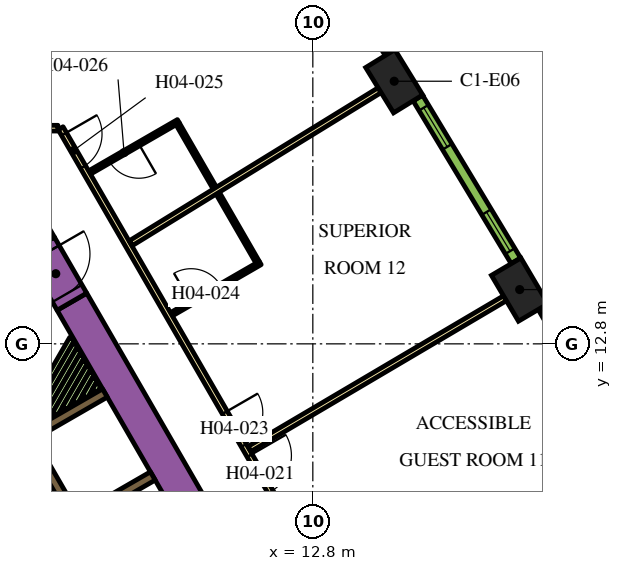
"""IFC4 building model, lengths in metres.
Left out: names, types, materials, properties, quantities, classifications, styles, units other than length and angle.
Written with IfcOpenShell. Run it as: python <this file> out.ifc"""

import sys

from ifc_helpers import new_model, si_unit, direction, frame, frame_2d, origin, origin_2d, place, context, subcontext, project, spatial, rectangle, extrude, element, fill, save


model = new_model("IFC4")
c1 = context("Model", 3, precision=1e-05, world=origin(), true_north=direction((0.0, 1.0)))
c2 = subcontext(c1, "Body", "Model", "MODEL_VIEW")
j1 = project(units=[si_unit("LENGTHUNIT", "METRE"), si_unit("PLANEANGLEUNIT", "RADIAN")], contexts=[c1])
p1 = place(None, origin())
s1 = spatial("IfcSite", under=j1, at=p1, CompositionType="ELEMENT")
p2 = place(p1, origin())
s2 = spatial("IfcBuilding", under=s1, at=p2, CompositionType="ELEMENT")
p3 = place(p2, frame((0.0, 0.0, 66.6)))
s3 = spatial("IfcBuildingStorey", under=s2, at=p3, CompositionType="ELEMENT", Elevation=66.6)
for number, where, z_axis, x_axis in (
    (1, (18.243, 14.228, 0.0), (0.0, 0.0, 1.0), (-0.508, 0.861, 0.0)),
    (2, (14.942, 19.71, 0.0), (0.0, 0.0, 1.0), (-0.524, 0.852, 0.0)),
):
    element("IfcColumn", number, at=place(p3, frame(where, z_axis=z_axis, x_axis=x_axis)), inside=s3, PredefinedType="COLUMN", context=c2, shape_type="SweptSolid", body=[
        extrude(rectangle(XDim=1.4, YDim=0.9, at=origin_2d()), origin(), (0.0, 0.0, 1.0), 3.9),
    ])
p4 = place(p3, frame((6.461, 13.909, 0.0), z_axis=(0.0, 0.0, 1.0), x_axis=(0.500005804227, -0.866022052686, 0.0)))
e3 = element("IfcWall", 3, at=p4, inside=s3, PredefinedType="SOLIDWALL", context=c2, shape_type="SweptSolid", body=[
    extrude(rectangle(XDim=20.834, YDim=0.9, at=frame_2d((10.417, 0.0))), origin(), (0.0, 0.0, 1.0), 3.9),
])
p5 = place(p3, frame((5.611, 15.382, 0.0), z_axis=(0.0, 0.0, 1.0), x_axis=(-0.500102178127, 0.865966403178, 0.0)))
e4 = element("IfcWall", 4, at=p5, inside=s3, PredefinedType="SOLIDWALL", context=c2, shape_type="SweptSolid", body=[
    extrude(rectangle(XDim=0.464, YDim=0.9, at=frame_2d((0.232, 0.0))), origin(), (0.0, 0.0, 1.0), 3.9),
])
p6 = place(p3, frame((6.684, 8.224, 0.0), z_axis=(0.0, 0.0, 1.0), x_axis=(0.86605622881, 0.499946605688, 0.0)))
e5 = element("IfcWall", 5, at=p6, inside=s3, PredefinedType="SOLIDWALL", context=c2, shape_type="SweptSolid", body=[
    extrude(rectangle(XDim=2.2, YDim=0.25, at=frame_2d((1.1, 0.0))), origin(), (0.0, 0.0, 1.0), 3.9),
])
p7 = place(p3, frame((4.776, 10.032, 0.0), z_axis=(0.0, 0.0, 1.0), x_axis=(0.86600215702, 0.500040262416, 0.0)))
e6 = element("IfcWall", 6, at=p7, inside=s3, PredefinedType="SOLIDWALL", context=c2, shape_type="SweptSolid", body=[
    extrude(rectangle(XDim=2.948, YDim=0.25, at=frame_2d((1.474, 0.0))), origin(), (0.0, 0.0, 1.0), 3.9),
])
p8 = place(p3, frame((4.982, 10.359, 0.0), z_axis=(0.0, 0.0, 1.0), x_axis=(0.500051824031, 0.865995481099, 0.0)))
e7 = element("IfcWall", 7, at=p8, inside=s3, PredefinedType="PARTITIONING", context=c2, shape_type="SweptSolid", body=[
    extrude(rectangle(XDim=2.973, YDim=0.15, at=frame_2d((1.486, 0.0))), origin(), (0.0, 0.0, 1.0), 2.75),
])
p9 = place(p3, frame((5.242, 10.509, 0.0), z_axis=(0.0, 0.0, 1.0), x_axis=(0.499958506883, 0.866049358521, 0.0)))
e8 = element("IfcWall", 8, at=p9, inside=s3, PredefinedType="PARTITIONING", context=c2, shape_type="SweptSolid", body=[
    extrude(rectangle(XDim=2.626, YDim=0.15, at=frame_2d((1.313, 0.0))), origin(), (0.0, 0.0, 1.0), 2.75),
])
p10 = place(p3, frame((5.501, 10.659, 0.0), z_axis=(0.0, 0.0, 1.0), x_axis=(0.499951092774, 0.866053638543, 0.0)))
e9 = element("IfcWall", 9, at=p10, inside=s3, PredefinedType="PARTITIONING", context=c2, shape_type="SweptSolid", body=[
    extrude(rectangle(XDim=2.28, YDim=0.15, at=frame_2d((1.14, 0.0))), origin(), (0.0, 0.0, 1.0), 2.75),
])
p11 = place(p3, frame((5.761, 10.809, 0.0), z_axis=(0.0, 0.0, 1.0), x_axis=(0.499900985997, 0.866082561999, 0.0)))
e10 = element("IfcWall", 10, at=p11, inside=s3, PredefinedType="PARTITIONING", context=c2, shape_type="SweptSolid", body=[
    extrude(rectangle(XDim=1.934, YDim=0.15, at=frame_2d((0.967, 0.0))), origin(), (0.0, 0.0, 1.0), 2.75),
])
p12 = place(p3, frame((6.021, 10.959, 0.0), z_axis=(0.0, 0.0, 1.0), x_axis=(0.499944387978, 0.86605750902, 0.0)))
e11 = element("IfcWall", 11, at=p12, inside=s3, PredefinedType="PARTITIONING", context=c2, shape_type="SweptSolid", body=[
    extrude(rectangle(XDim=1.587, YDim=0.15, at=frame_2d((0.793, 0.0))), origin(), (0.0, 0.0, 1.0), 2.75),
])
p13 = place(p3, frame((6.281, 11.109, 0.0), z_axis=(0.0, 0.0, 1.0), x_axis=(0.500012022864, 0.866018462269, 0.0)))
e12 = element("IfcWall", 12, at=p13, inside=s3, PredefinedType="PARTITIONING", context=c2, shape_type="SweptSolid", body=[
    extrude(rectangle(XDim=1.241, YDim=0.15, at=frame_2d((0.62, 0.0))), origin(), (0.0, 0.0, 1.0), 2.75),
])
p14 = place(p3, frame((6.541, 11.259, 0.0), z_axis=(0.0, 0.0, 1.0), x_axis=(0.500132045864, 0.865949153646, 0.0)))
e13 = element("IfcWall", 13, at=p14, inside=s3, PredefinedType="PARTITIONING", context=c2, shape_type="SweptSolid", body=[
    extrude(rectangle(XDim=0.894, YDim=0.15, at=frame_2d((0.447, 0.0))), origin(), (0.0, 0.0, 1.0), 2.75),
])
p15 = place(p3, frame((6.8, 11.409, 0.0), z_axis=(0.0, 0.0, 1.0), x_axis=(0.500210807569, 0.865903659763, 0.0)))
e14 = element("IfcWall", 14, at=p15, inside=s3, PredefinedType="PARTITIONING", context=c2, shape_type="SweptSolid", body=[
    extrude(rectangle(XDim=0.548, YDim=0.15, at=frame_2d((0.274, 0.0))), origin(), (0.0, 0.0, 1.0), 2.75),
])
p16 = place(p3, frame((7.06, 11.559, 0.0), z_axis=(0.0, 0.0, 1.0), x_axis=(0.499267785915, 0.866447735266, 0.0)))
e15 = element("IfcWall", 15, at=p16, inside=s3, PredefinedType="PARTITIONING", context=c2, shape_type="SweptSolid", body=[
    extrude(rectangle(XDim=0.201, YDim=0.15, at=frame_2d((0.101, 0.0))), origin(), (0.0, 0.0, 1.0), 2.75),
])
p17 = place(p3, frame((11.553, -0.46, 0.0), z_axis=(0.0, 0.0, 1.0), x_axis=(-0.500006514828, 0.866021642414, 0.0)))
e16 = element("IfcWall", 16, at=p17, inside=s3, PredefinedType="SOLIDWALL", context=c2, shape_type="SweptSolid", body=[
    extrude(rectangle(XDim=12.35, YDim=0.25, at=frame_2d((6.175, 0.0))), origin(), (0.0, 0.0, 1.0), 3.9),
])
p18 = place(p17, frame((0.585, 0.0, 0.0)))
e17 = element("IfcOpeningElement", 17, at=p18, cuts=e16, PredefinedType="OPENING", context=c2, shape_type="SweptSolid", body=[
    extrude(rectangle(XDim=1.1, YDim=2.1, at=frame_2d((0.55, 1.05))), frame((0.0, 0.135, 0.0), z_axis=(0.0, -1.0, 0.0), x_axis=(1.0, 0.0, 0.0)), (0.0, 0.0, 1.0), 0.27),
])
p19 = place(p17, frame((3.105, 0.0, 0.0)))
e18 = element("IfcOpeningElement", 18, at=p19, cuts=e16, PredefinedType="OPENING", context=c2, shape_type="SweptSolid", body=[
    extrude(rectangle(XDim=1.1, YDim=2.1, at=frame_2d((0.55, 1.05))), frame((0.0, 0.135, 0.0), z_axis=(0.0, -1.0, 0.0), x_axis=(1.0, 0.0, 0.0)), (0.0, 0.0, 1.0), 0.27),
])
p20 = place(p17, frame((5.625, 0.0, 0.0)))
e19 = element("IfcOpeningElement", 19, at=p20, cuts=e16, PredefinedType="OPENING", context=c2, shape_type="SweptSolid", body=[
    extrude(rectangle(XDim=1.1, YDim=2.1, at=frame_2d((0.55, 1.05))), frame((0.0, 0.135, 0.0), z_axis=(0.0, -1.0, 0.0), x_axis=(1.0, 0.0, 0.0)), (0.0, 0.0, 1.0), 0.27),
])
p21 = place(p3, frame((5.611, 15.382, 0.0), z_axis=(0.0, 0.0, 1.0), x_axis=(0.500062241894, -0.865989465428, 0.0)))
e20 = element("IfcWall", 20, at=p21, inside=s3, PredefinedType="SOLIDWALL", context=c2, shape_type="SweptSolid", body=[
    extrude(rectangle(XDim=1.7, YDim=0.9, at=frame_2d((0.85, 0.0))), origin(), (0.0, 0.0, 1.0), 3.9),
])
p22 = place(p21, frame((0.25, 0.0, 0.0)))
e21 = element("IfcOpeningElement", 21, at=p22, cuts=e20, PredefinedType="OPENING", context=c2, shape_type="SweptSolid", body=[
    extrude(rectangle(XDim=1.2, YDim=2.1, at=frame_2d((0.6, 1.05))), frame((0.0, 0.46, 0.0), z_axis=(0.0, -1.0, 0.0), x_axis=(1.0, 0.0, 0.0)), (0.0, 0.0, 1.0), 0.92),
])
p23 = place(p3, frame((6.163, 18.475, 0.0), z_axis=(0.0, 0.0, 1.0), x_axis=(0.500001317485, -0.866024643133, 0.0)))
e22 = element("IfcWall", 22, at=p23, inside=s3, PredefinedType="PARTITIONING", context=c2, shape_type="SweptSolid", body=[
    extrude(rectangle(XDim=25.767, YDim=0.15, at=frame_2d((12.883, 0.0))), origin(), (0.0, 0.0, 1.0), 2.75),
])
p24 = place(p23, frame((21.138, 0.0, 0.0)))
e23 = element("IfcOpeningElement", 23, at=p24, cuts=e22, PredefinedType="OPENING", context=c2, shape_type="SweptSolid", body=[
    extrude(rectangle(XDim=1.0, YDim=2.1, at=frame_2d((0.5, 1.05))), frame((0.0, 0.085, 0.0), z_axis=(0.0, -1.0, 0.0), x_axis=(1.0, 0.0, 0.0)), (0.0, 0.0, 1.0), 0.17),
])
p25 = place(p23, frame((9.948, 0.0, 0.0)))
e24 = element("IfcOpeningElement", 24, at=p25, cuts=e22, PredefinedType="OPENING", context=c2, shape_type="SweptSolid", body=[
    extrude(rectangle(XDim=1.1, YDim=2.1, at=frame_2d((0.55, 1.05))), frame((0.0, 0.085, 0.0), z_axis=(0.0, -1.0, 0.0), x_axis=(1.0, 0.0, 0.0)), (0.0, 0.0, 1.0), 0.17),
])
p26 = place(p23, frame((8.641, 0.0, 0.0)))
e25 = element("IfcOpeningElement", 25, at=p26, cuts=e22, PredefinedType="OPENING", context=c2, shape_type="SweptSolid", body=[
    extrude(rectangle(XDim=1.0, YDim=2.1, at=frame_2d((0.5, 1.05))), frame((0.0, 0.085, 0.0), z_axis=(0.0, -1.0, 0.0), x_axis=(1.0, 0.0, 0.0)), (0.0, 0.0, 1.0), 0.17),
])
p27 = place(p23, frame((0.18, 0.0, 0.0)))
e26 = element("IfcOpeningElement", 26, at=p27, cuts=e22, PredefinedType="OPENING", context=c2, shape_type="SweptSolid", body=[
    extrude(rectangle(XDim=1.0, YDim=2.1, at=frame_2d((0.5, 1.05))), frame((0.0, 0.085, 0.0), z_axis=(0.0, -1.0, 0.0), x_axis=(1.0, 0.0, 0.0)), (0.0, 0.0, 1.0), 0.17),
])
p28 = place(p3, frame((0.825, 18.475, 0.0), z_axis=(0.0, 0.0, 1.0), x_axis=(1.0, 0.0, 0.0)))
e27 = element("IfcWall", 27, at=p28, inside=s3, PredefinedType="PARTITIONING", context=c2, shape_type="SweptSolid", body=[
    extrude(rectangle(XDim=5.268, YDim=0.15, at=frame_2d((2.634, 0.0))), origin(), (0.0, 0.0, 1.0), 2.75),
])
p29 = place(p3, frame((11.16, 24.888, 0.0), z_axis=(0.0, 0.0, 1.0), x_axis=(-0.84199813156, -0.539480441211, 0.0)))
e28 = element("IfcWall", 28, at=p29, inside=s3, PredefinedType="PARTITIONING", context=c2, shape_type="SweptSolid", body=[
    extrude(rectangle(XDim=11.638, YDim=0.15, at=frame_2d((5.819, 0.0))), origin(), (0.0, 0.0, 1.0), 2.75),
])
p30 = place(p3, frame((14.558, 19.475, 0.0), z_axis=(0.0, 0.0, 1.0), x_axis=(-0.851829455142, -0.523819223925, 0.0)))
e29 = element("IfcWall", 29, at=p30, inside=s3, PredefinedType="PARTITIONING", context=c2, shape_type="SweptSolid", body=[
    extrude(rectangle(XDim=7.688, YDim=0.15, at=frame_2d((3.844, 0.0))), origin(), (0.0, 0.0, 1.0), 2.75),
])
p31 = place(p3, frame((17.856, 13.999, 0.0), z_axis=(0.0, 0.0, 1.0), x_axis=(-0.861371519381, -0.507975497047, 0.0)))
e30 = element("IfcWall", 30, at=p31, inside=s3, PredefinedType="PARTITIONING", context=c2, shape_type="SweptSolid", body=[
    extrude(rectangle(XDim=7.804, YDim=0.15, at=frame_2d((3.902, 0.0))), origin(), (0.0, 0.0, 1.0), 2.75),
])
p32 = place(p3, frame((9.077, 13.578, 0.0), z_axis=(0.0, 0.0, 1.0), x_axis=(0.866036505625, 0.499980770555, 0.0)))
e31 = element("IfcWall", 31, at=p32, inside=s3, PredefinedType="PARTITIONING", context=c2, shape_type="SweptSolid", body=[
    extrude(rectangle(XDim=2.7, YDim=0.1, at=frame_2d((1.35, 0.0))), origin(), (0.0, 0.0, 1.0), 2.75),
])
p33 = place(p32, frame((0.6, 0.0, 0.0)))
e32 = element("IfcOpeningElement", 32, at=p33, cuts=e31, PredefinedType="OPENING", context=c2, shape_type="SweptSolid", body=[
    extrude(rectangle(XDim=0.9, YDim=2.1, at=frame_2d((0.45, 1.05))), frame((0.0, 0.06, 0.0), z_axis=(0.0, -1.0, 0.0), x_axis=(1.0, 0.0, 0.0)), (0.0, 0.0, 1.0), 0.12),
])
p34 = place(p3, frame((11.342, 14.955, 0.0), z_axis=(0.0, 0.0, 1.0), x_axis=(-0.500008976872, 0.866020220923, 0.0)))
e33 = element("IfcWall", 33, at=p34, inside=s3, PredefinedType="PARTITIONING", context=c2, shape_type="SweptSolid", body=[
    extrude(rectangle(XDim=2.09, YDim=0.1, at=frame_2d((1.045, 0.0))), origin(), (0.0, 0.0, 1.0), 2.75),
])
p35 = place(p3, frame((9.262, 18.658, 0.0), z_axis=(0.0, 0.0, 1.0), x_axis=(-0.866019956843, -0.50000943426, 0.0)))
e34 = element("IfcWall", 34, at=p35, inside=s3, PredefinedType="PARTITIONING", context=c2, shape_type="SweptSolid", body=[
    extrude(rectangle(XDim=2.7, YDim=0.1, at=frame_2d((1.35, 0.0))), origin(), (0.0, 0.0, 1.0), 2.75),
])
p36 = place(p35, frame((1.2, 0.0, 0.0)))
e35 = element("IfcOpeningElement", 35, at=p36, cuts=e34, PredefinedType="OPENING", context=c2, shape_type="SweptSolid", body=[
    extrude(rectangle(XDim=0.9, YDim=2.1, at=frame_2d((0.45, 1.05))), frame((0.0, 0.06, 0.0), z_axis=(0.0, -1.0, 0.0), x_axis=(1.0, 0.0, 0.0)), (0.0, 0.0, 1.0), 0.12),
])
p37 = place(p3, frame((9.244, 18.589, 0.0), z_axis=(0.0, 0.0, 1.0), x_axis=(0.500043961785, -0.866000020948, 0.0)))
e36 = element("IfcWall", 36, at=p37, inside=s3, PredefinedType="PARTITIONING", context=c2, shape_type="SweptSolid", body=[
    extrude(rectangle(XDim=1.95, YDim=0.1, at=frame_2d((0.975, 0.0))), origin(), (0.0, 0.0, 1.0), 2.75),
])
p38 = place(p3, frame((21.357, 9.445, 0.0), z_axis=(0.0, 0.0, 1.0), x_axis=(-0.50002123722, 0.866013142123, 0.0)))
e37 = element("IfcWall", 37, at=p38, inside=s3, PredefinedType="SOLIDWALL", context=c2, shape_type="SweptSolid", body=[
    extrude(rectangle(XDim=4.998, YDim=0.29, at=frame_2d((2.499, 0.0))), origin(), (0.0, 0.0, 1.0), 3.65),
])
p39 = place(p38, frame((0.297, 0.0, 0.9)))
e38 = element("IfcOpeningElement", 38, at=p39, cuts=e37, PredefinedType="OPENING", context=c2, shape_type="SweptSolid", body=[
    extrude(rectangle(XDim=1.2, YDim=2.15, at=frame_2d((0.6, 1.075))), frame((0.0, 0.155, 0.0), z_axis=(0.0, -1.0, 0.0), x_axis=(1.0, 0.0, 0.0)), (0.0, 0.0, 1.0), 0.31),
])
p40 = place(p38, frame((3.501, 0.0, 0.9)))
e39 = element("IfcOpeningElement", 39, at=p40, cuts=e37, PredefinedType="OPENING", context=c2, shape_type="SweptSolid", body=[
    extrude(rectangle(XDim=1.2, YDim=2.15, at=frame_2d((0.6, 1.075))), frame((0.0, 0.155, 0.0), z_axis=(0.0, -1.0, 0.0), x_axis=(1.0, 0.0, 0.0)), (0.0, 0.0, 1.0), 0.31),
])
p41 = place(p3, frame((18.143, 14.986, 0.0), z_axis=(0.0, 0.0, 1.0), x_axis=(-0.515938796285, 0.856625448191, 0.0)))
e40 = element("IfcWall", 40, at=p41, inside=s3, PredefinedType="SOLIDWALL", context=c2, shape_type="SweptSolid", body=[
    extrude(rectangle(XDim=4.998, YDim=0.29, at=frame_2d((2.499, 0.0))), origin(), (0.0, 0.0, 1.0), 3.65),
])
p42 = place(p41, frame((0.297, 0.0, 0.9)))
e41 = element("IfcOpeningElement", 41, at=p42, cuts=e40, PredefinedType="OPENING", context=c2, shape_type="SweptSolid", body=[
    extrude(rectangle(XDim=1.2, YDim=2.15, at=frame_2d((0.6, 1.075))), frame((0.0, 0.155, 0.0), z_axis=(0.0, -1.0, 0.0), x_axis=(1.0, 0.0, 0.0)), (0.0, 0.0, 1.0), 0.31),
])
p43 = place(p41, frame((3.501, 0.0, 0.9)))
e42 = element("IfcOpeningElement", 42, at=p43, cuts=e40, PredefinedType="OPENING", context=c2, shape_type="SweptSolid", body=[
    extrude(rectangle(XDim=1.2, YDim=2.15, at=frame_2d((0.6, 1.075))), frame((0.0, 0.155, 0.0), z_axis=(0.0, -1.0, 0.0), x_axis=(1.0, 0.0, 0.0)), (0.0, 0.0, 1.0), 0.31),
])
p44 = place(p3, frame((14.827, 20.466, 0.0), z_axis=(0.0, 0.0, 1.0), x_axis=(-0.531688286542, 0.846940119462, 0.0)))
e43 = element("IfcWall", 43, at=p44, inside=s3, PredefinedType="SOLIDWALL", context=c2, shape_type="SweptSolid", body=[
    extrude(rectangle(XDim=4.998, YDim=0.29, at=frame_2d((2.499, 0.0))), origin(), (0.0, 0.0, 1.0), 3.65),
])
p45 = place(p44, frame((0.297, 0.0, 0.9)))
e44 = element("IfcOpeningElement", 44, at=p45, cuts=e43, PredefinedType="OPENING", context=c2, shape_type="SweptSolid", body=[
    extrude(rectangle(XDim=1.2, YDim=2.15, at=frame_2d((0.6, 1.075))), frame((0.0, 0.155, 0.0), z_axis=(0.0, -1.0, 0.0), x_axis=(1.0, 0.0, 0.0)), (0.0, 0.0, 1.0), 0.31),
])
p46 = place(p44, frame((3.501, 0.0, 0.9)))
e45 = element("IfcOpeningElement", 45, at=p46, cuts=e43, PredefinedType="OPENING", context=c2, shape_type="SweptSolid", body=[
    extrude(rectangle(XDim=1.2, YDim=2.15, at=frame_2d((0.6, 1.075))), frame((0.0, 0.155, 0.0), z_axis=(0.0, -1.0, 0.0), x_axis=(1.0, 0.0, 0.0)), (0.0, 0.0, 1.0), 0.31),
])
p47 = place(p22, origin())
e46 = element("IfcDoor", 46, at=p47, inside=s3, OperationType="SINGLE_SWING_LEFT", PredefinedType="DOOR", context=c2, shape_type="SweptSolid", body=[
    extrude(rectangle(XDim=1.2, YDim=2.1, at=frame_2d((0.6, 1.05))), frame((0.0, 0.025, 0.0), z_axis=(0.0, -1.0, 0.0), x_axis=(1.0, 0.0, 0.0)), (0.0, 0.0, 1.0), 0.05),
])
fill(e21, e46)
p48 = place(p25, origin())
e47 = element("IfcDoor", 47, at=p48, inside=s3, OperationType="SINGLE_SWING_LEFT", PredefinedType="DOOR", context=c2, shape_type="SweptSolid", body=[
    extrude(rectangle(XDim=1.1, YDim=2.1, at=frame_2d((0.55, 1.05))), frame((0.0, 0.025, 0.0), z_axis=(0.0, -1.0, 0.0), x_axis=(1.0, 0.0, 0.0)), (0.0, 0.0, 1.0), 0.05),
])
fill(e24, e47)
p49 = place(p26, origin())
e48 = element("IfcDoor", 48, at=p49, inside=s3, OperationType="SINGLE_SWING_RIGHT", PredefinedType="DOOR", context=c2, shape_type="SweptSolid", body=[
    extrude(rectangle(XDim=1.0, YDim=2.1, at=frame_2d((0.5, 1.05))), frame((0.0, 0.025, 0.0), z_axis=(0.0, -1.0, 0.0), x_axis=(1.0, 0.0, 0.0)), (0.0, 0.0, 1.0), 0.05),
])
fill(e25, e48)
p50 = place(p33, origin())
e49 = element("IfcDoor", 49, at=p50, inside=s3, OperationType="SINGLE_SWING_RIGHT", PredefinedType="DOOR", context=c2, shape_type="SweptSolid", body=[
    extrude(rectangle(XDim=0.9, YDim=2.1, at=frame_2d((0.45, 1.05))), frame((0.0, 0.025, 0.0), z_axis=(0.0, -1.0, 0.0), x_axis=(1.0, 0.0, 0.0)), (0.0, 0.0, 1.0), 0.05),
])
fill(e32, e49)
p51 = place(p27, origin())
e50 = element("IfcDoor", 50, at=p51, inside=s3, OperationType="SINGLE_SWING_LEFT", PredefinedType="DOOR", context=c2, shape_type="SweptSolid", body=[
    extrude(rectangle(XDim=1.0, YDim=2.1, at=frame_2d((0.5, 1.05))), frame((0.0, 0.025, 0.0), z_axis=(0.0, -1.0, 0.0), x_axis=(1.0, 0.0, 0.0)), (0.0, 0.0, 1.0), 0.05),
])
fill(e26, e50)
p52 = place(p36, origin())
e51 = element("IfcDoor", 51, at=p52, inside=s3, OperationType="SINGLE_SWING_LEFT", PredefinedType="DOOR", context=c2, shape_type="SweptSolid", body=[
    extrude(rectangle(XDim=0.9, YDim=2.1, at=frame_2d((0.45, 1.05))), frame((0.0, 0.025, 0.0), z_axis=(0.0, -1.0, 0.0), x_axis=(1.0, 0.0, 0.0)), (0.0, 0.0, 1.0), 0.05),
])
fill(e35, e51)
p53 = place(p42, origin())
e52 = element("IfcWindow", 52, at=p53, inside=s3, PartitioningType="DOUBLE_PANEL_VERTICAL", PredefinedType="WINDOW", context=c2, shape_type="SweptSolid", body=[
    extrude(rectangle(XDim=1.2, YDim=2.15, at=frame_2d((0.6, 1.075))), frame((0.0, 0.015, 0.0), z_axis=(0.0, -1.0, 0.0), x_axis=(1.0, 0.0, 0.0)), (0.0, 0.0, 1.0), 0.06),
])
fill(e41, e52)
p54 = place(p43, origin())
e53 = element("IfcWindow", 53, at=p54, inside=s3, PartitioningType="DOUBLE_PANEL_VERTICAL", PredefinedType="WINDOW", context=c2, shape_type="SweptSolid", body=[
    extrude(rectangle(XDim=1.2, YDim=2.15, at=frame_2d((0.6, 1.075))), frame((0.0, 0.015, 0.0), z_axis=(0.0, -1.0, 0.0), x_axis=(1.0, 0.0, 0.0)), (0.0, 0.0, 1.0), 0.06),
])
fill(e42, e53)
save(model, sys.argv[1])
